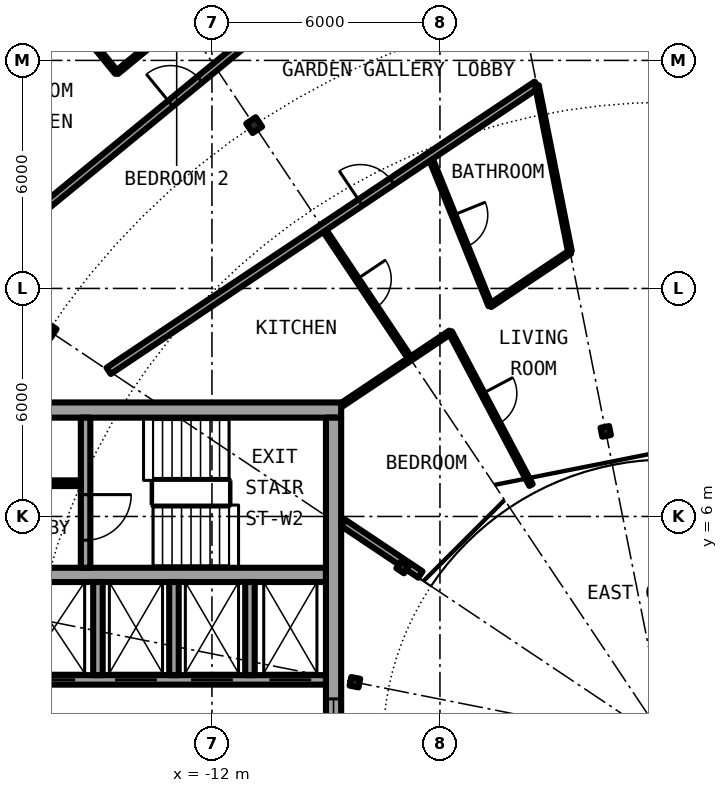
"""IFC4 building model, lengths in metres.
Left out: names, types, materials, properties, quantities, classifications, styles, units other than length and angle.
Written with IfcOpenShell. Run it as: python <this file> out.ifc"""

import sys

from ifc_helpers import new_model, si_unit, direction, frame, frame_2d, origin, origin_2d, place, context, subcontext, project, spatial, rectangle, i_section, extrude, element, fill, save


model = new_model("IFC4")
c1 = context("Model", 3, precision=1e-05, world=origin(), true_north=direction((0.0, 1.0)))
c2 = subcontext(c1, "Body", "Model", "MODEL_VIEW")
j1 = project(units=[si_unit("LENGTHUNIT", "METRE"), si_unit("PLANEANGLEUNIT", "RADIAN")], contexts=[c1])
p1 = place(None, origin())
s1 = spatial("IfcSite", under=j1, at=p1, CompositionType="ELEMENT")
p2 = place(p1, origin())
s2 = spatial("IfcBuilding", under=s1, at=p2, CompositionType="ELEMENT")
p3 = place(p2, frame((0.0, 0.0, 227.95)))
s3 = spatial("IfcBuildingStorey", under=s2, at=p3, CompositionType="ELEMENT", Elevation=227.95)
for number, where, z_axis, x_axis in (
    (1, (-10.889, 16.297, 0.0), (0.0, 0.0, 1.0), (-0.556, 0.831, 0.0)),
    (2, (-16.297, 10.889, 0.0), (0.0, 0.0, 1.0), (-0.831, 0.556, 0.0)),
):
    element("IfcColumn", number, at=place(p3, frame(where, z_axis=z_axis, x_axis=x_axis)), inside=s3, PredefinedType="COLUMN", context=c2, shape_type="SweptSolid", body=[
        extrude(i_section(OverallWidth=0.3, OverallDepth=0.3, WebThickness=0.011, FlangeThickness=0.019, FilletRadius=0.027, at=origin_2d()), origin(), (0.0, 0.0, 1.0), 3.05),
    ])
for number, where, z_axis, x_axis in (
    (3, (-1.639, 8.239, 0.0), (0.0, 0.0, 1.0), (-0.195, 0.981, 0.0)),
    (4, (-6.984, 4.667, 0.0), (0.0, 0.0, 1.0), (-0.831, 0.556, 0.0)),
    (5, (-8.239, 1.639, 0.0), (0.0, 0.0, 1.0), (-0.981, 0.195, 0.0)),
):
    element("IfcColumn", number, at=place(p3, frame(where, z_axis=z_axis, x_axis=x_axis)), inside=s3, PredefinedType="COLUMN", context=c2, shape_type="SweptSolid", body=[
        extrude(i_section(OverallWidth=0.24, OverallDepth=0.23, WebThickness=0.008, FlangeThickness=0.012, FilletRadius=0.021, at=origin_2d()), origin(), (0.0, 0.0, 1.0), 3.05),
    ])
p4 = place(p3, frame((-8.6, 8.8, 0.0), z_axis=(0.0, 0.0, 1.0), x_axis=(-1.0, 0.0, 0.0)))
e6 = element("IfcWall", 6, at=p4, inside=s3, PredefinedType="SHEAR", context=c2, shape_type="SweptSolid", body=[
    extrude(rectangle(XDim=13.4, YDim=0.4, at=frame_2d((6.7, 0.0))), origin(), (0.0, 0.0, 1.0), 3.05),
])
p5 = place(p4, frame((11.275, 0.0, 0.0)))
e7 = element("IfcOpeningElement", 7, at=p5, cuts=e6, PredefinedType="OPENING", context=c2, shape_type="SweptSolid", body=[
    extrude(rectangle(XDim=1.2, YDim=2.3, at=frame_2d((0.6, 1.15))), frame((0.0, 0.21, 0.0), z_axis=(0.0, -1.0, 0.0), x_axis=(1.0, 0.0, 0.0)), (0.0, 0.0, 1.0), 0.42),
])
p6 = place(p3, frame((-8.8, 8.6, 0.0), z_axis=(0.0, 0.0, 1.0), x_axis=(0.0, -1.0, 0.0)))
e8 = element("IfcWall", 8, at=p6, inside=s3, PredefinedType="SHEAR", context=c2, shape_type="SweptSolid", body=[
    extrude(rectangle(XDim=17.2, YDim=0.4, at=frame_2d((8.6, 0.0))), origin(), (0.0, 0.0, 1.0), 3.05),
])
p7 = place(p6, frame((7.4, 0.0, 0.1)))
e9 = element("IfcOpeningElement", 9, at=p7, cuts=e8, PredefinedType="OPENING", context=c2, shape_type="SweptSolid", body=[
    extrude(rectangle(XDim=2.4, YDim=2.2, at=frame_2d((1.2, 1.1))), frame((0.0, 0.21, 0.0), z_axis=(0.0, -1.0, 0.0), x_axis=(1.0, 0.0, 0.0)), (0.0, 0.0, 1.0), 0.42),
])
p8 = place(p3, frame((-9.0, 1.7, 0.0), z_axis=(0.0, 0.0, 1.0), x_axis=(-1.0, 0.0, 0.0)))
e10 = element("IfcWall", 10, at=p8, inside=s3, PredefinedType="SHEAR", context=c2, shape_type="SweptSolid", body=[
    extrude(rectangle(XDim=10.15, YDim=0.25, at=frame_2d((5.075, 0.0))), origin(), (0.0, 0.0, 1.0), 3.05),
])
p9 = place(p8, frame((0.387, 0.0, 0.0)))
e11 = element("IfcOpeningElement", 11, at=p9, cuts=e10, PredefinedType="OPENING", context=c2, shape_type="SweptSolid", body=[
    extrude(rectangle(XDim=1.1, YDim=2.3, at=frame_2d((0.55, 1.15))), frame((0.0, 0.135, 0.0), z_axis=(0.0, -1.0, 0.0), x_axis=(1.0, 0.0, 0.0)), (0.0, 0.0, 1.0), 0.27),
])
p10 = place(p8, frame((2.45, 0.0, 0.0)))
e12 = element("IfcOpeningElement", 12, at=p10, cuts=e10, PredefinedType="OPENING", context=c2, shape_type="SweptSolid", body=[
    extrude(rectangle(XDim=1.1, YDim=2.3, at=frame_2d((0.55, 1.15))), frame((0.0, 0.135, 0.0), z_axis=(0.0, -1.0, 0.0), x_axis=(1.0, 0.0, 0.0)), (0.0, 0.0, 1.0), 0.27),
])
p11 = place(p8, frame((4.45, 0.0, 0.0)))
e13 = element("IfcOpeningElement", 13, at=p11, cuts=e10, PredefinedType="OPENING", context=c2, shape_type="SweptSolid", body=[
    extrude(rectangle(XDim=1.1, YDim=2.3, at=frame_2d((0.55, 1.15))), frame((0.0, 0.135, 0.0), z_axis=(0.0, -1.0, 0.0), x_axis=(1.0, 0.0, 0.0)), (0.0, 0.0, 1.0), 0.27),
])
p12 = place(p8, frame((6.6, 0.0, 0.0)))
e14 = element("IfcOpeningElement", 14, at=p12, cuts=e10, PredefinedType="OPENING", context=c2, shape_type="SweptSolid", body=[
    extrude(rectangle(XDim=1.1, YDim=2.3, at=frame_2d((0.55, 1.15))), frame((0.0, 0.135, 0.0), z_axis=(0.0, -1.0, 0.0), x_axis=(1.0, 0.0, 0.0)), (0.0, 0.0, 1.0), 0.27),
])
p13 = place(p3, frame((-9.0, 4.462, 0.0), z_axis=(0.0, 0.0, 1.0), x_axis=(-1.0, 0.0, 0.0)))
e15 = element("IfcWall", 15, at=p13, inside=s3, PredefinedType="SHEAR", context=c2, shape_type="SweptSolid", body=[
    extrude(rectangle(XDim=10.15, YDim=0.375, at=frame_2d((5.075, 0.0))), origin(), (0.0, 0.0, 1.0), 3.05),
])
p14 = place(p3, frame((-15.325, 8.6, 0.0), z_axis=(0.0, 0.0, 1.0), x_axis=(0.0, -1.0, 0.0)))
e16 = element("IfcWall", 16, at=p14, inside=s3, PredefinedType="SHEAR", context=c2, shape_type="SweptSolid", body=[
    extrude(rectangle(XDim=3.95, YDim=0.25, at=frame_2d((1.975, 0.0))), origin(), (0.0, 0.0, 1.0), 3.05),
])
p15 = place(p14, frame((2.025, 0.0, 0.0)))
e17 = element("IfcOpeningElement", 17, at=p15, cuts=e16, PredefinedType="OPENING", context=c2, shape_type="SweptSolid", body=[
    extrude(rectangle(XDim=1.2, YDim=2.3, at=frame_2d((0.6, 1.15))), frame((0.0, 0.135, 0.0), z_axis=(0.0, -1.0, 0.0), x_axis=(1.0, 0.0, 0.0)), (0.0, 0.0, 1.0), 0.27),
])
for number, where, z_axis, x_axis in (
    (18, (-15.0, 1.825, 0.0), (0.0, 0.0, 1.0), (0.0, 1.0, 0.0)),
    (19, (-11.0, 1.825, 0.0), (0.0, 0.0, 1.0), (0.0, 1.0, 0.0)),
    (20, (-13.0, 1.825, 0.0), (0.0, 0.0, 1.0), (0.0, 1.0, 0.0)),
):
    element("IfcWall", number, at=place(p3, frame(where, z_axis=z_axis, x_axis=x_axis)), inside=s3, PredefinedType="SOLIDWALL", context=c2, shape_type="SweptSolid", body=[
        extrude(rectangle(XDim=2.45, YDim=0.25, at=frame_2d((1.225, 0.0))), origin(), (0.0, 0.0, 1.0), 2.7),
    ])
p16 = place(p3, frame((-15.45, 6.875, 0.0), z_axis=(0.0, 0.0, 1.0), x_axis=(-1.0, 0.0, 0.0)))
e21 = element("IfcWall", 21, at=p16, inside=s3, PredefinedType="PARTITIONING", context=c2, shape_type="SweptSolid", body=[
    extrude(rectangle(XDim=3.7, YDim=0.15, at=frame_2d((1.85, 0.0))), origin(), (0.0, 0.0, 1.0), 2.7),
])
p17 = place(p16, frame((1.4, 0.0, 0.0)))
e22 = element("IfcOpeningElement", 22, at=p17, cuts=e21, PredefinedType="OPENING", context=c2, shape_type="SweptSolid", body=[
    extrude(rectangle(XDim=0.9, YDim=2.3, at=frame_2d((0.45, 1.15))), frame((0.0, 0.085, 0.0), z_axis=(0.0, -1.0, 0.0), x_axis=(1.0, 0.0, 0.0)), (0.0, 0.0, 1.0), 0.17),
])
p18 = place(p3, frame((-17.24, 21.007, 0.0), z_axis=(0.0, 0.0, 1.0), x_axis=(0.634342681687, -0.77305197897, 0.0)))
e23 = element("IfcWall", 23, at=p18, inside=s3, PredefinedType="PARTITIONING", context=c2, shape_type="SweptSolid", body=[
    extrude(rectangle(XDim=4.305, YDim=0.1, at=frame_2d((2.153, 0.0))), origin(), (0.0, 0.0, 1.0), 2.7),
])
p19 = place(p18, frame((1.703, 0.0, 0.0)))
e24 = element("IfcOpeningElement", 24, at=p19, cuts=e23, PredefinedType="OPENING", context=c2, shape_type="SweptSolid", body=[
    extrude(rectangle(XDim=0.9, YDim=2.3, at=frame_2d((0.45, 1.15))), frame((0.0, 0.06, 0.0), z_axis=(0.0, -1.0, 0.0), x_axis=(1.0, 0.0, 0.0)), (0.0, 0.0, 1.0), 0.12),
])
p20 = place(p3, frame((-9.085, 13.597, 0.0), z_axis=(0.0, 0.0, 1.0), x_axis=(0.555528237031, -0.831497671591, 0.0)))
e25 = element("IfcWall", 25, at=p20, inside=s3, PredefinedType="PARTITIONING", context=c2, shape_type="SweptSolid", body=[
    extrude(rectangle(XDim=4.149, YDim=0.1, at=frame_2d((2.075, 0.0))), origin(), (0.0, 0.0, 1.0), 2.7),
])
p21 = place(p20, frame((1.625, 0.0, 0.0)))
e26 = element("IfcOpeningElement", 26, at=p21, cuts=e25, PredefinedType="OPENING", context=c2, shape_type="SweptSolid", body=[
    extrude(rectangle(XDim=0.9, YDim=2.3, at=frame_2d((0.45, 1.15))), frame((0.0, 0.06, 0.0), z_axis=(0.0, -1.0, 0.0), x_axis=(1.0, 0.0, 0.0)), (0.0, 0.0, 1.0), 0.12),
])
p22 = place(p3, frame((-6.269, 15.478, 0.0), z_axis=(0.0, 0.0, 1.0), x_axis=(0.375509828455, -0.926818411952, 0.0)))
e27 = element("IfcWall", 27, at=p22, inside=s3, PredefinedType="PARTITIONING", context=c2, shape_type="SweptSolid", body=[
    extrude(rectangle(XDim=4.237, YDim=0.1, at=frame_2d((2.119, 0.0))), origin(), (0.0, 0.0, 1.0), 2.7),
])
p23 = place(p22, frame((1.669, 0.0, 0.0)))
e28 = element("IfcOpeningElement", 28, at=p23, cuts=e27, PredefinedType="OPENING", context=c2, shape_type="SweptSolid", body=[
    extrude(rectangle(XDim=0.9, YDim=2.3, at=frame_2d((0.45, 1.15))), frame((0.0, 0.06, 0.0), z_axis=(0.0, -1.0, 0.0), x_axis=(1.0, 0.0, 0.0)), (0.0, 0.0, 1.0), 0.12),
])
p24 = place(p3, frame((-5.729, 10.849, 0.0), z_axis=(0.0, 0.0, 1.0), x_axis=(0.466962677975, -0.884277025246, 0.0)))
e29 = element("IfcWall", 29, at=p24, inside=s3, PredefinedType="PARTITIONING", context=c2, shape_type="SweptSolid", body=[
    extrude(rectangle(XDim=4.549, YDim=0.1, at=frame_2d((2.274, 0.0))), origin(), (0.0, 0.0, 1.0), 2.7),
])
p25 = place(p24, frame((1.824, 0.0, 0.0)))
e30 = element("IfcOpeningElement", 30, at=p25, cuts=e29, PredefinedType="OPENING", context=c2, shape_type="SweptSolid", body=[
    extrude(rectangle(XDim=0.9, YDim=2.3, at=frame_2d((0.45, 1.15))), frame((0.0, 0.06, 0.0), z_axis=(0.0, -1.0, 0.0), x_axis=(1.0, 0.0, 0.0)), (0.0, 0.0, 1.0), 0.12),
])
p26 = place(p3, frame((-6.513, 4.472, 0.0), z_axis=(0.0, 0.0, 1.0), x_axis=(-0.831450132577, 0.555599385382, 0.0)))
e31 = element("IfcWall", 31, at=p26, inside=s3, PredefinedType="PARTITIONING", context=c2, shape_type="SweptSolid", body=[
    extrude(rectangle(XDim=2.443, YDim=0.2, at=frame_2d((1.221, 0.0))), origin(), (0.0, 0.0, 1.0), 2.7),
])
p27 = place(p3, frame((-8.601, 8.929, 0.0), z_axis=(0.0, 0.0, 1.0), x_axis=(0.831397130511, 0.555678694372, 0.0)))
e32 = element("IfcWall", 32, at=p27, inside=s3, PredefinedType="PARTITIONING", context=c2, shape_type="SweptSolid", body=[
    extrude(rectangle(XDim=3.453, YDim=0.1, at=frame_2d((1.727, 0.0))), origin(), (0.0, 0.0, 1.0), 2.7),
])
p28 = place(p3, frame((-4.678, 11.551, 0.0), z_axis=(0.0, 0.0, 1.0), x_axis=(0.831440395268, 0.555613956912, 0.0)))
e33 = element("IfcWall", 33, at=p28, inside=s3, PredefinedType="PARTITIONING", context=c2, shape_type="SweptSolid", body=[
    extrude(rectangle(XDim=2.527, YDim=0.1, at=frame_2d((1.264, 0.0))), origin(), (0.0, 0.0, 1.0), 2.7),
])
p29 = place(p3, frame((-14.718, 9.832, 0.0), z_axis=(0.0, 0.0, 1.0), x_axis=(0.831437137577, 0.555618831806, 0.0)))
e34 = element("IfcWall", 34, at=p29, inside=s3, PredefinedType="PARTITIONING", context=c2, shape_type="SweptSolid", body=[
    extrude(rectangle(XDim=13.549, YDim=0.2, at=frame_2d((6.774, 0.0))), origin(), (0.0, 0.0, 1.0), 2.7),
])
p30 = place(p29, frame((7.968, 0.0, 0.0)))
e35 = element("IfcOpeningElement", 35, at=p30, cuts=e34, PredefinedType="OPENING", context=c2, shape_type="SweptSolid", body=[
    extrude(rectangle(XDim=1.0, YDim=2.3, at=frame_2d((0.5, 1.15))), frame((0.0, 0.11, 0.0), z_axis=(0.0, -1.0, 0.0), x_axis=(1.0, 0.0, 0.0)), (0.0, 0.0, 1.0), 0.22),
])
p31 = place(p3, frame((-18.542, 12.389, 0.0), z_axis=(0.0, 0.0, 1.0), x_axis=(0.772983503654, 0.634426121056, 0.0)))
e36 = element("IfcWall", 36, at=p31, inside=s3, PredefinedType="PARTITIONING", context=c2, shape_type="SweptSolid", body=[
    extrude(rectangle(XDim=12.947, YDim=0.2, at=frame_2d((6.474, 0.0))), origin(), (0.0, 0.0, 1.0), 2.7),
])
p32 = place(p31, frame((7.053, 0.0, 0.0)))
e37 = element("IfcOpeningElement", 37, at=p32, cuts=e36, PredefinedType="OPENING", context=c2, shape_type="SweptSolid", body=[
    extrude(rectangle(XDim=1.0, YDim=2.3, at=frame_2d((0.5, 1.15))), frame((0.0, 0.11, 0.0), z_axis=(0.0, -1.0, 0.0), x_axis=(1.0, 0.0, 0.0)), (0.0, 0.0, 1.0), 0.22),
])
p33 = place(p3, frame((-14.505, 17.681, 0.0), z_axis=(0.0, 0.0, 1.0), x_axis=(0.773067618794, 0.634323621484, 0.0)))
e38 = element("IfcWall", 38, at=p33, inside=s3, PredefinedType="PARTITIONING", context=c2, shape_type="SweptSolid", body=[
    extrude(rectangle(XDim=6.938, YDim=0.1, at=frame_2d((3.469, 0.0))), origin(), (0.0, 0.0, 1.0), 2.7),
])
p34 = place(p33, frame((3.016, 0.0, 0.0)))
e39 = element("IfcOpeningElement", 39, at=p34, cuts=e38, PredefinedType="OPENING", context=c2, shape_type="SweptSolid", body=[
    extrude(rectangle(XDim=0.9, YDim=2.3, at=frame_2d((0.45, 1.15))), frame((0.0, 0.06, 0.0), z_axis=(0.0, -1.0, 0.0), x_axis=(1.0, 0.0, 0.0)), (0.0, 0.0, 1.0), 0.12),
])
p35 = place(p33, frame((5.325, 0.0, 0.0)))
e40 = element("IfcOpeningElement", 40, at=p35, cuts=e38, PredefinedType="OPENING", context=c2, shape_type="SweptSolid", body=[
    extrude(rectangle(XDim=0.9, YDim=2.3, at=frame_2d((0.45, 1.15))), frame((0.0, 0.06, 0.0), z_axis=(0.0, -1.0, 0.0), x_axis=(1.0, 0.0, 0.0)), (0.0, 0.0, 1.0), 0.12),
])
p36 = place(p3, frame((-3.449, 17.339, 0.0), z_axis=(0.0, 0.0, 1.0), x_axis=(0.195102838171, -0.980782790702, 0.0)))
e41 = element("IfcWall", 41, at=p36, inside=s3, PredefinedType="PARTITIONING", context=c2, shape_type="SweptSolid", body=[
    extrude(rectangle(XDim=4.448, YDim=0.1, at=frame_2d((2.224, 0.0))), origin(), (0.0, 0.0, 1.0), 2.7),
])
p37 = place(p9, origin())
e42 = element("IfcDoor", 42, at=p37, inside=s3, OperationType="DOUBLE_DOOR_SLIDING", PredefinedType="DOOR", context=c2, shape_type="SweptSolid", body=[
    extrude(rectangle(XDim=1.1, YDim=2.3, at=frame_2d((0.55, 1.15))), frame((0.0, 0.025, 0.0), z_axis=(0.0, -1.0, 0.0), x_axis=(1.0, 0.0, 0.0)), (0.0, 0.0, 1.0), 0.05),
])
fill(e11, e42)
p38 = place(p10, origin())
e43 = element("IfcDoor", 43, at=p38, inside=s3, OperationType="DOUBLE_DOOR_SLIDING", PredefinedType="DOOR", context=c2, shape_type="SweptSolid", body=[
    extrude(rectangle(XDim=1.1, YDim=2.3, at=frame_2d((0.55, 1.15))), frame((0.0, 0.025, 0.0), z_axis=(0.0, -1.0, 0.0), x_axis=(1.0, 0.0, 0.0)), (0.0, 0.0, 1.0), 0.05),
])
fill(e12, e43)
p39 = place(p11, origin())
e44 = element("IfcDoor", 44, at=p39, inside=s3, OperationType="DOUBLE_DOOR_SLIDING", PredefinedType="DOOR", context=c2, shape_type="SweptSolid", body=[
    extrude(rectangle(XDim=1.1, YDim=2.3, at=frame_2d((0.55, 1.15))), frame((0.0, 0.025, 0.0), z_axis=(0.0, -1.0, 0.0), x_axis=(1.0, 0.0, 0.0)), (0.0, 0.0, 1.0), 0.05),
])
fill(e13, e44)
p40 = place(p12, origin())
e45 = element("IfcDoor", 45, at=p40, inside=s3, OperationType="DOUBLE_DOOR_SLIDING", PredefinedType="DOOR", context=c2, shape_type="SweptSolid", body=[
    extrude(rectangle(XDim=1.1, YDim=2.3, at=frame_2d((0.55, 1.15))), frame((0.0, 0.025, 0.0), z_axis=(0.0, -1.0, 0.0), x_axis=(1.0, 0.0, 0.0)), (0.0, 0.0, 1.0), 0.05),
])
fill(e14, e45)
p41 = place(p15, origin())
e46 = element("IfcDoor", 46, at=p41, inside=s3, OperationType="SINGLE_SWING_LEFT", PredefinedType="DOOR", context=c2, shape_type="SweptSolid", body=[
    extrude(rectangle(XDim=1.2, YDim=2.3, at=frame_2d((0.6, 1.15))), frame((0.0, 0.025, 0.0), z_axis=(0.0, -1.0, 0.0), x_axis=(1.0, 0.0, 0.0)), (0.0, 0.0, 1.0), 0.05),
])
fill(e17, e46)
p42 = place(p7, origin())
e47 = element("IfcWindow", 47, at=p42, inside=s3, PartitioningType="SINGLE_PANEL", PredefinedType="WINDOW", context=c2, shape_type="SweptSolid", body=[
    extrude(rectangle(XDim=2.4, YDim=2.2, at=frame_2d((1.2, 1.1))), frame((0.0, 0.03, 0.0), z_axis=(0.0, -1.0, 0.0), x_axis=(1.0, 0.0, 0.0)), (0.0, 0.0, 1.0), 0.06),
])
fill(e9, e47)
p43 = place(p32, origin())
e48 = element("IfcDoor", 48, at=p43, inside=s3, OperationType="SINGLE_SWING_RIGHT", PredefinedType="DOOR", context=c2, shape_type="SweptSolid", body=[
    extrude(rectangle(XDim=1.0, YDim=2.3, at=frame_2d((0.5, 1.15))), frame((0.0, 0.025, 0.0), z_axis=(0.0, -1.0, 0.0), x_axis=(1.0, 0.0, 0.0)), (0.0, 0.0, 1.0), 0.05),
])
fill(e37, e48)
p44 = place(p30, origin())
e49 = element("IfcDoor", 49, at=p44, inside=s3, OperationType="SINGLE_SWING_RIGHT", PredefinedType="DOOR", context=c2, shape_type="SweptSolid", body=[
    extrude(rectangle(XDim=1.0, YDim=2.3, at=frame_2d((0.5, 1.15))), frame((0.0, 0.025, 0.0), z_axis=(0.0, -1.0, 0.0), x_axis=(1.0, 0.0, 0.0)), (0.0, 0.0, 1.0), 0.05),
])
fill(e35, e49)
p45 = place(p23, origin())
e50 = element("IfcDoor", 50, at=p45, inside=s3, OperationType="SINGLE_SWING_LEFT", PredefinedType="DOOR", context=c2, shape_type="SweptSolid", body=[
    extrude(rectangle(XDim=0.9, YDim=2.3, at=frame_2d((0.45, 1.15))), frame((0.0, 0.025, 0.0), z_axis=(0.0, -1.0, 0.0), x_axis=(1.0, 0.0, 0.0)), (0.0, 0.0, 1.0), 0.05),
])
fill(e28, e50)
p46 = place(p21, origin())
e51 = element("IfcDoor", 51, at=p46, inside=s3, OperationType="SINGLE_SWING_LEFT", PredefinedType="DOOR", context=c2, shape_type="SweptSolid", body=[
    extrude(rectangle(XDim=0.9, YDim=2.3, at=frame_2d((0.45, 1.15))), frame((0.0, 0.025, 0.0), z_axis=(0.0, -1.0, 0.0), x_axis=(1.0, 0.0, 0.0)), (0.0, 0.0, 1.0), 0.05),
])
fill(e26, e51)
p47 = place(p25, origin())
e52 = element("IfcDoor", 52, at=p47, inside=s3, OperationType="SINGLE_SWING_RIGHT", PredefinedType="DOOR", context=c2, shape_type="SweptSolid", body=[
    extrude(rectangle(XDim=0.9, YDim=2.3, at=frame_2d((0.45, 1.15))), frame((0.0, 0.025, 0.0), z_axis=(0.0, -1.0, 0.0), x_axis=(1.0, 0.0, 0.0)), (0.0, 0.0, 1.0), 0.05),
])
fill(e30, e52)
save(model, sys.argv[1])
